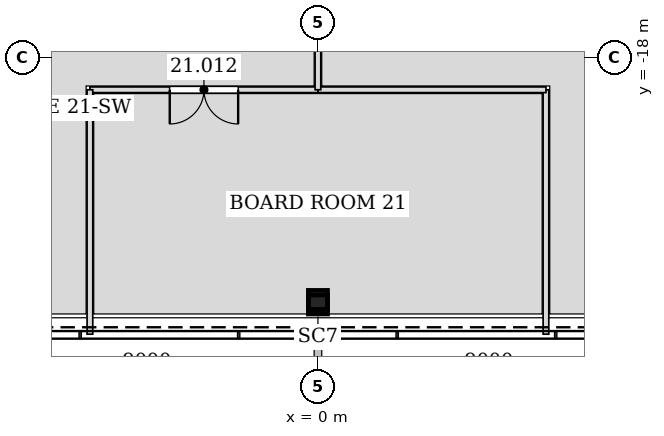
"""IFC4 building model, lengths in metres.
Left out: names, types, materials, properties, quantities, classifications, styles, units other than length and angle.
Written with IfcOpenShell. Run it as: python <this file> out.ifc"""

import sys

from ifc_helpers import new_model, si_unit, direction, frame, frame_2d, origin, origin_2d, place, context, subcontext, project, spatial, rectangle, hollow_rectangle, extrude, element, fill, save


model = new_model("IFC4")
c1 = context("Model", 3, precision=1e-05, world=origin(), true_north=direction((0.0, 1.0)))
c2 = subcontext(c1, "Body", "Model", "MODEL_VIEW")
j1 = project(units=[si_unit("LENGTHUNIT", "METRE"), si_unit("PLANEANGLEUNIT", "RADIAN")], contexts=[c1])
p1 = place(None, origin())
s1 = spatial("IfcSite", under=j1, at=p1, CompositionType="ELEMENT")
p2 = place(p1, origin())
s2 = spatial("IfcBuilding", under=s1, at=p2, CompositionType="ELEMENT")
p3 = place(p2, frame((0.0, 0.0, 96.0)))
s3 = spatial("IfcBuildingStorey", under=s2, at=p3, CompositionType="ELEMENT", Elevation=96.0)
p4 = place(p3, frame((0.0, -24.499, 0.0), z_axis=(0.0, 0.028297679255, 0.99959954049), x_axis=(-1.0, 0.0, 0.0)))
e1 = element("IfcColumn", 1, at=p4, inside=s3, PredefinedType="COLUMN", context=c2, shape_type="SweptSolid", body=[
    extrude(hollow_rectangle(XDim=0.5, YDim=0.5, WallThickness=0.025, at=origin_2d()), origin(), (0.0, 0.0, 1.0), 4.202),
])
p5 = place(p3, frame((0.001, -18.849, 0.0), z_axis=(0.0, 0.0, 1.0), x_axis=(-1.0, 0.0, 0.0)))
e2 = element("IfcWall", 2, at=p5, inside=s3, PredefinedType="PARTITIONING", context=c2, shape_type="SweptSolid", body=[
    extrude(rectangle(XDim=6.001, YDim=0.15, at=frame_2d((3.0, 0.0))), origin(), (0.0, 0.0, 1.0), 3.014),
])
p6 = place(p5, frame((2.101, 0.0, 0.0)))
e3 = element("IfcOpeningElement", 3, at=p6, cuts=e2, PredefinedType="OPENING", context=c2, shape_type="SweptSolid", body=[
    extrude(rectangle(XDim=1.8, YDim=2.4, at=frame_2d((0.9, 1.2))), frame((0.0, 0.085, 0.0), z_axis=(0.0, -1.0, 0.0), x_axis=(1.0, 0.0, 0.0)), (0.0, 0.0, 1.0), 0.17),
])
for number, where, z_axis, x_axis in (
    (4, (-6.0, -18.849, 0.0), (0.0, 0.0, 1.0), (0.0, -1.0, 0.0)),
    (5, (6.0, -25.281, 0.0), (0.0, 0.0, 1.0), (0.0, 1.0, 0.0)),
):
    element("IfcWall", number, at=place(p3, frame(where, z_axis=z_axis, x_axis=x_axis)), inside=s3, PredefinedType="PARTITIONING", context=c2, shape_type="SweptSolid", body=[
        extrude(rectangle(XDim=6.432, YDim=0.15, at=frame_2d((3.216, 0.0))), origin(), (0.0, 0.0, 1.0), 3.423),
    ])
p7 = place(p3, frame((6.0, -18.849, 0.0), z_axis=(0.0, 0.0, 1.0), x_axis=(-1.0, 0.0, 0.0)))
e6 = element("IfcWall", 6, at=p7, inside=s3, PredefinedType="PARTITIONING", context=c2, shape_type="SweptSolid", body=[
    extrude(rectangle(XDim=6.001, YDim=0.15, at=frame_2d((3.0, 0.0))), origin(), (0.0, 0.0, 1.0), 3.014),
])
p8 = place(p3, frame((0.0, -18.849, 0.0), z_axis=(0.0, 0.0, 1.0), x_axis=(0.0, 1.0, 0.0)))
e7 = element("IfcWall", 7, at=p8, inside=s3, PredefinedType="PARTITIONING", context=c2, shape_type="SweptSolid", body=[
    extrude(rectangle(XDim=5.799, YDim=0.15, at=frame_2d((2.899, 0.0))), origin(), (0.0, 0.0, 1.0), 3.014),
])
p9 = place(p6, origin())
e8 = element("IfcDoor", 8, at=p9, inside=s3, OperationType="DOUBLE_DOOR_SINGLE_SWING", PredefinedType="DOOR", context=c2, shape_type="SweptSolid", body=[
    extrude(rectangle(XDim=1.8, YDim=2.4, at=frame_2d((0.9, 1.2))), frame((0.0, 0.025, 0.0), z_axis=(0.0, -1.0, 0.0), x_axis=(1.0, 0.0, 0.0)), (0.0, 0.0, 1.0), 0.05),
])
fill(e3, e8)
save(model, sys.argv[1])
